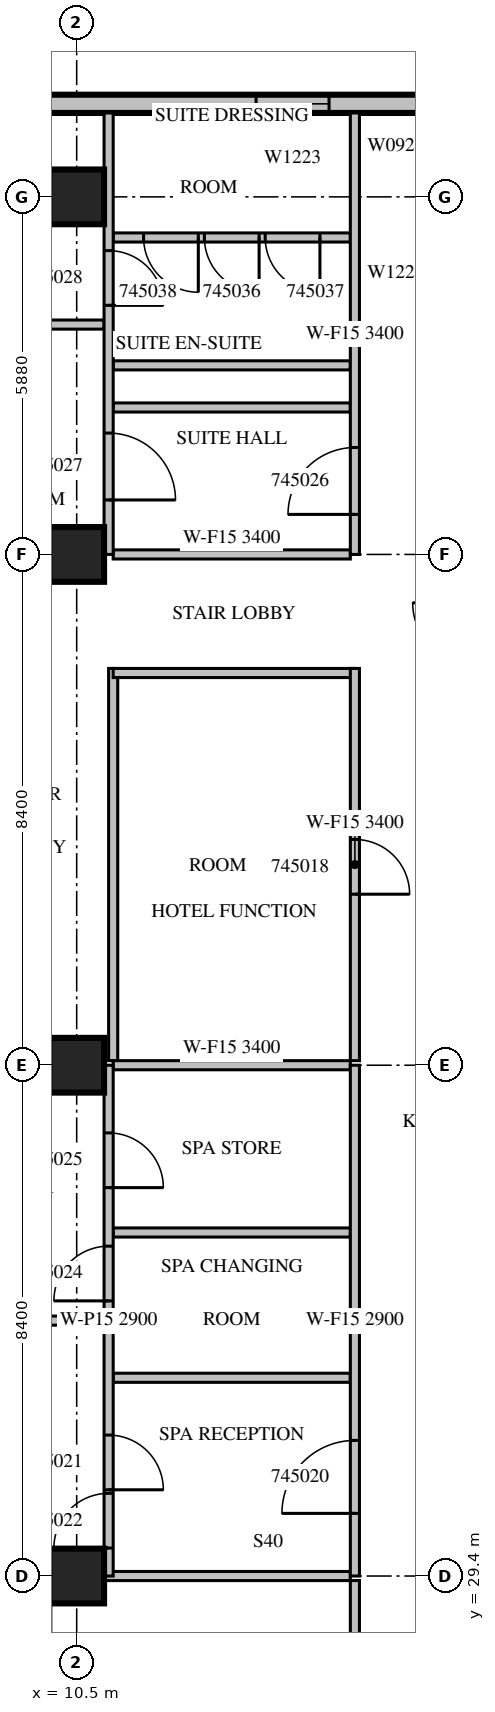
"""IFC4 building model, lengths in metres.
Left out: names, types, materials, properties, quantities, classifications, styles, units other than length and angle.
Written with IfcOpenShell. Run it as: python <this file> out.ifc"""

import sys

from ifc_helpers import new_model, si_unit, direction, frame, frame_2d, origin, origin_2d, place, context, subcontext, project, spatial, rectangle, extrude, source, transform, mapped, element, fill, save


model = new_model("IFC4")
c1 = context("Model", 3, precision=1e-05, world=origin(), true_north=direction((0.0, 1.0)))
c2 = subcontext(c1, "Body", "Model", "MODEL_VIEW")
j1 = project(units=[si_unit("LENGTHUNIT", "METRE"), si_unit("PLANEANGLEUNIT", "RADIAN")], contexts=[c1])
p1 = place(None, origin())
s1 = spatial("IfcSite", under=j1, at=p1, CompositionType="ELEMENT")
p2 = place(p1, origin())
s2 = spatial("IfcBuilding", under=s1, at=p2, CompositionType="ELEMENT")
p3 = place(p2, frame((0.0, 0.0, 204.4)))
s3 = spatial("IfcBuildingStorey", under=s2, at=p3, CompositionType="ELEMENT", Elevation=204.4)
m1 = source(origin(), c2, "Body", "SweptSolid", [
    extrude(rectangle(XDim=0.9, YDim=0.9, at=origin_2d()), origin(), (0.0, 0.0, 1.0), 3.8),
])
for number, where, z_axis, x_axis in (
    (1, (10.5, 29.4, 0.0), (0.0, 0.0, 1.0), (1.0, 0.0, 0.0)),
    (2, (10.5, 37.8, 0.0), (0.0, 0.0, 1.0), (1.0, 0.0, 0.0)),
    (3, (10.5, 46.2, 0.0), (0.0, 0.0, 1.0), (1.0, 0.0, 0.0)),
    (4, (10.5, 52.08, 0.0), (0.0, 0.0, 1.0), (1.0, 0.0, 0.0)),
):
    element("IfcColumn", number, at=place(p3, frame(where, z_axis=z_axis, x_axis=x_axis)), inside=s3, PredefinedType="COLUMN", context=c2, shape_type="MappedRepresentation", body=[
        mapped(m1, transform((0.0, 0.0, 0.0), scale=1.0)),
    ])
m2 = source(origin(), c2, "Body", "SweptSolid", [
    extrude(rectangle(XDim=10.5, YDim=0.3, at=frame_2d((5.25, 0.0))), origin(), (0.0, 0.0, 1.0), 3.4),
])
p4 = place(p3, frame((16.8, 53.61, 0.0), z_axis=(0.0, 0.0, 1.0), x_axis=(-1.0, 0.0, 0.0)))
e5 = element("IfcWall", 5, at=p4, inside=s3, PredefinedType="STANDARD", context=c2, shape_type="MappedRepresentation", body=[
    mapped(m2, transform((0.0, 0.0, 0.0), scale=1.0)),
])
m3 = source(origin(), c2, "Body", "SweptSolid", [
    extrude(rectangle(XDim=1.2, YDim=2.3, at=frame_2d((0.6, 1.15))), frame((0.0, 0.16, 0.0), z_axis=(0.0, -1.0, 0.0), x_axis=(1.0, 0.0, 0.0)), (0.0, 0.0, 1.0), 0.32),
])
p5 = place(p4, frame((2.15, 0.0, 0.6)))
e6 = element("IfcOpeningElement", 6, at=p5, cuts=e5, PredefinedType="OPENING", context=c2, shape_type="MappedRepresentation", body=[
    mapped(m3, transform((0.0, 0.0, 0.0), scale=1.0)),
])
m4 = source(origin(), c2, "Body", "SweptSolid", [
    extrude(rectangle(XDim=1.8, YDim=2.3, at=frame_2d((0.9, 1.15))), frame((0.0, 0.16, 0.0), z_axis=(0.0, -1.0, 0.0), x_axis=(1.0, 0.0, 0.0)), (0.0, 0.0, 1.0), 0.32),
])
p6 = place(p4, frame((8.025, 0.0, 0.6)))
e7 = element("IfcOpeningElement", 7, at=p6, cuts=e5, PredefinedType="OPENING", context=c2, shape_type="MappedRepresentation", body=[
    mapped(m4, transform((0.0, 0.0, 0.0), scale=1.0)),
])
m5 = source(origin(), c2, "Body", "SweptSolid", [
    extrude(rectangle(XDim=4.85, YDim=0.15, at=frame_2d((2.425, 0.0))), origin(), (0.0, 0.0, 1.0), 3.4),
])
p7 = place(p3, frame((15.075, 24.475, 0.0), z_axis=(0.0, 0.0, 1.0), x_axis=(0.0, 1.0, 0.0)))
e8 = element("IfcWall", 8, at=p7, inside=s3, PredefinedType="PARTITIONING", context=c2, shape_type="MappedRepresentation", body=[
    mapped(m5, transform((0.0, 0.0, 0.0), scale=1.0)),
])
m6 = source(origin(), c2, "Body", "SweptSolid", [
    extrude(rectangle(XDim=4.051, YDim=0.15, at=frame_2d((2.026, 0.0))), origin(), (0.0, 0.0, 1.0), 3.4),
])
p8 = place(p3, frame((15.0, 29.4, 0.0), z_axis=(0.0, 0.0, 1.0), x_axis=(-1.0, 0.0, 0.0)))
e9 = element("IfcWall", 9, at=p8, inside=s3, PredefinedType="PARTITIONING", context=c2, shape_type="MappedRepresentation", body=[
    mapped(m6, transform((0.0, 0.0, 0.0), scale=1.0)),
])
m7 = source(origin(), c2, "Body", "SweptSolid", [
    extrude(rectangle(XDim=6.45, YDim=0.15, at=frame_2d((3.225, 0.0))), origin(), (0.0, 0.0, 1.0), 3.4),
])
p9 = place(p3, frame((11.1, 44.325, 0.0), z_axis=(0.0, 0.0, 1.0), x_axis=(0.0, -1.0, 0.0)))
e10 = element("IfcWall", 10, at=p9, inside=s3, PredefinedType="PARTITIONING", context=c2, shape_type="MappedRepresentation", body=[
    mapped(m7, transform((0.0, 0.0, 0.0), scale=1.0)),
])
m8 = source(origin(), c2, "Body", "SweptSolid", [
    extrude(rectangle(XDim=3.975, YDim=0.15, at=frame_2d((1.988, 0.0))), origin(), (0.0, 0.0, 1.0), 3.4),
])
p10 = place(p3, frame((15.075, 44.25, 0.0), z_axis=(0.0, 0.0, 1.0), x_axis=(-1.0, 0.0, 0.0)))
e11 = element("IfcWall", 11, at=p10, inside=s3, PredefinedType="PARTITIONING", context=c2, shape_type="MappedRepresentation", body=[
    mapped(m8, transform((0.0, 0.0, 0.0), scale=1.0)),
])
p11 = place(p3, frame((15.075, 37.875, 0.0), z_axis=(0.0, 0.0, 1.0), x_axis=(0.0, 1.0, 0.0)))
e12 = element("IfcWall", 12, at=p11, inside=s3, PredefinedType="PARTITIONING", context=c2, shape_type="MappedRepresentation", body=[
    mapped(m7, transform((0.0, 0.0, 0.0), scale=1.0)),
])
m9 = source(origin(), c2, "Body", "SweptSolid", [
    extrude(rectangle(XDim=0.9, YDim=2.1, at=frame_2d((0.45, 1.05))), frame((0.0, 0.085, 0.0), z_axis=(0.0, -1.0, 0.0), x_axis=(1.0, 0.0, 0.0)), (0.0, 0.0, 1.0), 0.17),
])
p12 = place(p11, frame((2.737, 0.0, 0.0)))
e13 = element("IfcOpeningElement", 13, at=p12, cuts=e12, PredefinedType="OPENING", context=c2, shape_type="MappedRepresentation", body=[
    mapped(m9, transform((0.0, 0.0, 0.0), scale=1.0)),
])
p13 = place(p3, frame((10.95, 33.6, 0.0), z_axis=(0.0, 0.0, 1.0), x_axis=(-1.0, 0.0, 0.0)))
e14 = element("IfcWall", 14, at=p13, inside=s3, PredefinedType="PARTITIONING", context=c2, shape_type="SweptSolid", body=[
    extrude(rectangle(XDim=4.445, YDim=0.15, at=frame_2d((2.223, 0.0))), origin(), (0.0, 0.0, 1.0), 2.4),
])
m10 = source(origin(), c2, "Body", "SweptSolid", [
    extrude(rectangle(XDim=1.0, YDim=2.1, at=frame_2d((0.5, 1.05))), frame((0.0, 0.085, 0.0), z_axis=(0.0, -1.0, 0.0), x_axis=(1.0, 0.0, 0.0)), (0.0, 0.0, 1.0), 0.17),
])
p14 = place(p13, frame((3.325, 0.0, 0.0)))
e15 = element("IfcOpeningElement", 15, at=p14, cuts=e14, PredefinedType="OPENING", context=c2, shape_type="MappedRepresentation", body=[
    mapped(m10, transform((0.0, 0.0, 0.0), scale=1.0)),
])
m11 = source(origin(), c2, "Body", "SweptSolid", [
    extrude(rectangle(XDim=3.9, YDim=0.15, at=frame_2d((1.95, 0.0))), origin(), (0.0, 0.0, 1.0), 3.4),
])
for number, where, z_axis, x_axis in (
    (16, (15.0, 32.66, 0.0), (0.0, 0.0, 1.0), (-1.0, 0.0, 0.0)),
    (17, (15.0, 35.049, 0.0), (0.0, 0.0, 1.0), (-1.0, 0.0, 0.0)),
    (18, (15.0, 37.8, 0.0), (0.0, 0.0, 1.0), (-1.0, 0.0, 0.0)),
):
    element("IfcWall", number, at=place(p3, frame(where, z_axis=z_axis, x_axis=x_axis)), inside=s3, PredefinedType="PARTITIONING", context=c2, shape_type="MappedRepresentation", body=[
        mapped(m11, transform((0.0, 0.0, 0.0), scale=1.0)),
    ])
m12 = source(origin(), c2, "Body", "SweptSolid", [
    extrude(rectangle(XDim=8.4, YDim=0.15, at=frame_2d((4.2, 0.0))), origin(), (0.0, 0.0, 1.0), 2.9),
])
p15 = place(p3, frame((11.025, 29.4, 0.0), z_axis=(0.0, 0.0, 1.0), x_axis=(0.0, 1.0, 0.0)))
e19 = element("IfcWall", 19, at=p15, inside=s3, PredefinedType="PARTITIONING", context=c2, shape_type="MappedRepresentation", body=[
    mapped(m12, transform((0.0, 0.0, 0.0), scale=1.0)),
])
p16 = place(p15, frame((1.418, 0.0, 0.0)))
e20 = element("IfcOpeningElement", 20, at=p16, cuts=e19, PredefinedType="OPENING", context=c2, shape_type="MappedRepresentation", body=[
    mapped(m9, transform((0.0, 0.0, 0.0), scale=1.0)),
])
p17 = place(p15, frame((0.46, 0.0, 0.0)))
e21 = element("IfcOpeningElement", 21, at=p17, cuts=e19, PredefinedType="OPENING", context=c2, shape_type="MappedRepresentation", body=[
    mapped(m9, transform((0.0, 0.0, 0.0), scale=1.0)),
])
p18 = place(p15, frame((4.525, 0.0, 0.0)))
e22 = element("IfcOpeningElement", 22, at=p18, cuts=e19, PredefinedType="OPENING", context=c2, shape_type="MappedRepresentation", body=[
    mapped(m9, transform((0.0, 0.0, 0.0), scale=1.0)),
])
p19 = place(p15, frame((6.387, 0.0, 0.0)))
e23 = element("IfcOpeningElement", 23, at=p19, cuts=e19, PredefinedType="OPENING", context=c2, shape_type="MappedRepresentation", body=[
    mapped(m9, transform((0.0, 0.0, 0.0), scale=1.0)),
])
m13 = source(origin(), c2, "Body", "SweptSolid", [
    extrude(rectangle(XDim=4.445, YDim=0.15, at=frame_2d((2.223, 0.0))), origin(), (0.0, 0.0, 1.0), 3.4),
])
p20 = place(p3, frame((10.95, 49.98, 0.0), z_axis=(0.0, 0.0, 1.0), x_axis=(-1.0, 0.0, 0.0)))
e24 = element("IfcWall", 24, at=p20, inside=s3, PredefinedType="PARTITIONING", context=c2, shape_type="MappedRepresentation", body=[
    mapped(m13, transform((0.0, 0.0, 0.0), scale=1.0)),
])
p21 = place(p20, frame((3.325, 0.0, 0.0)))
e25 = element("IfcOpeningElement", 25, at=p21, cuts=e24, PredefinedType="OPENING", context=c2, shape_type="MappedRepresentation", body=[
    mapped(m10, transform((0.0, 0.0, 0.0), scale=1.0)),
])
for number, where, z_axis, x_axis in (
    (26, (15.0, 48.617, 0.0), (0.0, 0.0, 1.0), (-1.0, 0.0, 0.0)),
    (27, (15.0, 49.309, 0.0), (0.0, 0.0, 1.0), (-1.0, 0.0, 0.0)),
):
    element("IfcWall", number, at=place(p3, frame(where, z_axis=z_axis, x_axis=x_axis)), inside=s3, PredefinedType="PARTITIONING", context=c2, shape_type="MappedRepresentation", body=[
        mapped(m11, transform((0.0, 0.0, 0.0), scale=1.0)),
    ])
p22 = place(p3, frame((15.0, 51.412, 0.0), z_axis=(0.0, 0.0, 1.0), x_axis=(-1.0, 0.0, 0.0)))
e28 = element("IfcWall", 28, at=p22, inside=s3, PredefinedType="PARTITIONING", context=c2, shape_type="MappedRepresentation", body=[
    mapped(m11, transform((0.0, 0.0, 0.0), scale=1.0)),
])
p23 = place(p22, frame((1.5, 0.0, 0.0)))
e29 = element("IfcOpeningElement", 29, at=p23, cuts=e28, PredefinedType="OPENING", context=c2, shape_type="MappedRepresentation", body=[
    mapped(m9, transform((0.0, 0.0, 0.0), scale=1.0)),
])
p24 = place(p22, frame((0.5, 0.0, 0.0)))
e30 = element("IfcOpeningElement", 30, at=p24, cuts=e28, PredefinedType="OPENING", context=c2, shape_type="MappedRepresentation", body=[
    mapped(m9, transform((0.0, 0.0, 0.0), scale=1.0)),
])
p25 = place(p22, frame((2.5, 0.0, 0.0)))
e31 = element("IfcOpeningElement", 31, at=p25, cuts=e28, PredefinedType="OPENING", context=c2, shape_type="MappedRepresentation", body=[
    mapped(m9, transform((0.0, 0.0, 0.0), scale=1.0)),
])
p26 = place(p3, frame((15.0, 46.2, 0.0), z_axis=(0.0, 0.0, 1.0), x_axis=(-1.0, 0.0, 0.0)))
e32 = element("IfcWall", 32, at=p26, inside=s3, PredefinedType="PARTITIONING", context=c2, shape_type="MappedRepresentation", body=[
    mapped(m11, transform((0.0, 0.0, 0.0), scale=1.0)),
])
m14 = source(origin(), c2, "Body", "SweptSolid", [
    extrude(rectangle(XDim=7.26, YDim=0.15, at=frame_2d((3.63, 0.0))), origin(), (0.0, 0.0, 1.0), 3.4),
])
p27 = place(p3, frame((11.025, 46.2, 0.0), z_axis=(0.0, 0.0, 1.0), x_axis=(0.0, 1.0, 0.0)))
e33 = element("IfcWall", 33, at=p27, inside=s3, PredefinedType="PARTITIONING", context=c2, shape_type="MappedRepresentation", body=[
    mapped(m14, transform((0.0, 0.0, 0.0), scale=1.0)),
])
m15 = source(origin(), c2, "Body", "SweptSolid", [
    extrude(rectangle(XDim=1.1, YDim=2.1, at=frame_2d((0.55, 1.05))), frame((0.0, 0.085, 0.0), z_axis=(0.0, -1.0, 0.0), x_axis=(1.0, 0.0, 0.0)), (0.0, 0.0, 1.0), 0.17),
])
p28 = place(p27, frame((0.896, 0.0, 0.0)))
e34 = element("IfcOpeningElement", 34, at=p28, cuts=e33, PredefinedType="OPENING", context=c2, shape_type="MappedRepresentation", body=[
    mapped(m15, transform((0.0, 0.0, 0.0), scale=1.0)),
])
p29 = place(p27, frame((4.096, 0.0, 0.0)))
e35 = element("IfcOpeningElement", 35, at=p29, cuts=e33, PredefinedType="OPENING", context=c2, shape_type="MappedRepresentation", body=[
    mapped(m9, transform((0.0, 0.0, 0.0), scale=1.0)),
])
p30 = place(p3, frame((15.075, 29.4, 0.0), z_axis=(0.0, 0.0, 1.0), x_axis=(0.0, 1.0, 0.0)))
e36 = element("IfcWall", 36, at=p30, inside=s3, PredefinedType="PARTITIONING", context=c2, shape_type="MappedRepresentation", body=[
    mapped(m12, transform((0.0, 0.0, 0.0), scale=1.0)),
])
m16 = source(origin(), c2, "Body", "SweptSolid", [
    extrude(rectangle(XDim=1.2, YDim=2.1, at=frame_2d((0.6, 1.05))), frame((0.0, 0.085, 0.0), z_axis=(0.0, -1.0, 0.0), x_axis=(1.0, 0.0, 0.0)), (0.0, 0.0, 1.0), 0.17),
])
p31 = place(p30, frame((1.03, 0.0, 0.0)))
e37 = element("IfcOpeningElement", 37, at=p31, cuts=e36, PredefinedType="OPENING", context=c2, shape_type="MappedRepresentation", body=[
    mapped(m16, transform((0.0, 0.0, 0.0), scale=1.0)),
])
p32 = place(p3, frame((15.075, 46.2, 0.0), z_axis=(0.0, 0.0, 1.0), x_axis=(0.0, 1.0, 0.0)))
e38 = element("IfcWall", 38, at=p32, inside=s3, PredefinedType="PARTITIONING", context=c2, shape_type="MappedRepresentation", body=[
    mapped(m14, transform((0.0, 0.0, 0.0), scale=1.0)),
])
p33 = place(p32, frame((0.658, 0.0, 0.0)))
e39 = element("IfcOpeningElement", 39, at=p33, cuts=e38, PredefinedType="OPENING", context=c2, shape_type="MappedRepresentation", body=[
    mapped(m15, transform((0.0, 0.0, 0.0), scale=1.0)),
])
m17 = source(origin(), c2, "Body", "SweptSolid", [
    extrude(rectangle(XDim=1.2, YDim=2.3, at=frame_2d((0.6, 1.15))), frame((0.0, 0.03, 0.0), z_axis=(0.0, -1.0, 0.0), x_axis=(1.0, 0.0, 0.0)), (0.0, 0.0, 1.0), 0.06),
])
p34 = place(p5, origin())
e40 = element("IfcWindow", 40, at=p34, inside=s3, PartitioningType="SINGLE_PANEL", PredefinedType="WINDOW", context=c2, shape_type="MappedRepresentation", body=[
    mapped(m17, transform((0.0, 0.0, 0.0), scale=1.0)),
])
fill(e6, e40)
m18 = source(origin(), c2, "Body", "SweptSolid", [
    extrude(rectangle(XDim=0.9, YDim=2.1, at=frame_2d((0.45, 1.05))), frame((0.0, 0.025, 0.0), z_axis=(0.0, -1.0, 0.0), x_axis=(1.0, 0.0, 0.0)), (0.0, 0.0, 1.0), 0.05),
])
p35 = place(p12, origin())
e41 = element("IfcDoor", 41, at=p35, inside=s3, OperationType="SINGLE_SWING_RIGHT", PredefinedType="DOOR", context=c2, shape_type="MappedRepresentation", body=[
    mapped(m18, transform((0.0, 0.0, 0.0), scale=1.0)),
])
fill(e13, e41)
m19 = source(origin(), c2, "Body", "SweptSolid", [
    extrude(rectangle(XDim=1.2, YDim=2.1, at=frame_2d((0.6, 1.05))), frame((0.0, 0.025, 0.0), z_axis=(0.0, -1.0, 0.0), x_axis=(1.0, 0.0, 0.0)), (0.0, 0.0, 1.0), 0.05),
])
p36 = place(p31, origin())
e42 = element("IfcDoor", 42, at=p36, inside=s3, OperationType="SINGLE_SWING_LEFT", PredefinedType="DOOR", context=c2, shape_type="MappedRepresentation", body=[
    mapped(m19, transform((0.0, 0.0, 0.0), scale=1.0)),
])
fill(e37, e42)
p37 = place(p16, origin())
e43 = element("IfcDoor", 43, at=p37, inside=s3, OperationType="SINGLE_SWING_RIGHT", PredefinedType="DOOR", context=c2, shape_type="MappedRepresentation", body=[
    mapped(m18, transform((0.0, 0.0, 0.0), scale=1.0)),
])
fill(e20, e43)
p38 = place(p17, origin())
e44 = element("IfcDoor", 44, at=p38, inside=s3, OperationType="SINGLE_SWING_LEFT", PredefinedType="DOOR", context=c2, shape_type="MappedRepresentation", body=[
    mapped(m18, transform((0.0, 0.0, 0.0), scale=1.0)),
])
fill(e21, e44)
p39 = place(p18, origin())
e45 = element("IfcDoor", 45, at=p39, inside=s3, OperationType="SINGLE_SWING_LEFT", PredefinedType="DOOR", context=c2, shape_type="MappedRepresentation", body=[
    mapped(m18, transform((0.0, 0.0, 0.0), scale=1.0)),
])
fill(e22, e45)
p40 = place(p19, origin())
e46 = element("IfcDoor", 46, at=p40, inside=s3, OperationType="SINGLE_SWING_RIGHT", PredefinedType="DOOR", context=c2, shape_type="MappedRepresentation", body=[
    mapped(m18, transform((0.0, 0.0, 0.0), scale=1.0)),
])
fill(e23, e46)
m20 = source(origin(), c2, "Body", "SweptSolid", [
    extrude(rectangle(XDim=1.1, YDim=2.1, at=frame_2d((0.55, 1.05))), frame((0.0, 0.025, 0.0), z_axis=(0.0, -1.0, 0.0), x_axis=(1.0, 0.0, 0.0)), (0.0, 0.0, 1.0), 0.05),
])
p41 = place(p33, origin())
e47 = element("IfcDoor", 47, at=p41, inside=s3, OperationType="SINGLE_SWING_LEFT", PredefinedType="DOOR", context=c2, shape_type="MappedRepresentation", body=[
    mapped(m20, transform((0.0, 0.0, 0.0), scale=1.0)),
])
fill(e39, e47)
p42 = place(p28, origin())
e48 = element("IfcDoor", 48, at=p42, inside=s3, OperationType="SINGLE_SWING_RIGHT", PredefinedType="DOOR", context=c2, shape_type="MappedRepresentation", body=[
    mapped(m20, transform((0.0, 0.0, 0.0), scale=1.0)),
])
fill(e34, e48)
p43 = place(p29, origin())
e49 = element("IfcDoor", 49, at=p43, inside=s3, OperationType="SINGLE_SWING_RIGHT", PredefinedType="DOOR", context=c2, shape_type="MappedRepresentation", body=[
    mapped(m18, transform((0.0, 0.0, 0.0), scale=1.0)),
])
fill(e35, e49)
p44 = place(p23, origin())
e50 = element("IfcDoor", 50, at=p44, inside=s3, OperationType="SINGLE_SWING_LEFT", PredefinedType="DOOR", context=c2, shape_type="MappedRepresentation", body=[
    mapped(m18, transform((0.0, 0.0, 0.0), scale=1.0)),
])
fill(e29, e50)
p45 = place(p24, origin())
e51 = element("IfcDoor", 51, at=p45, inside=s3, OperationType="SINGLE_SWING_LEFT", PredefinedType="DOOR", context=c2, shape_type="MappedRepresentation", body=[
    mapped(m18, transform((0.0, 0.0, 0.0), scale=1.0)),
])
fill(e30, e51)
p46 = place(p25, origin())
e52 = element("IfcDoor", 52, at=p46, inside=s3, OperationType="SINGLE_SWING_LEFT", PredefinedType="DOOR", context=c2, shape_type="MappedRepresentation", body=[
    mapped(m18, transform((0.0, 0.0, 0.0), scale=1.0)),
])
fill(e31, e52)
save(model, sys.argv[1])
